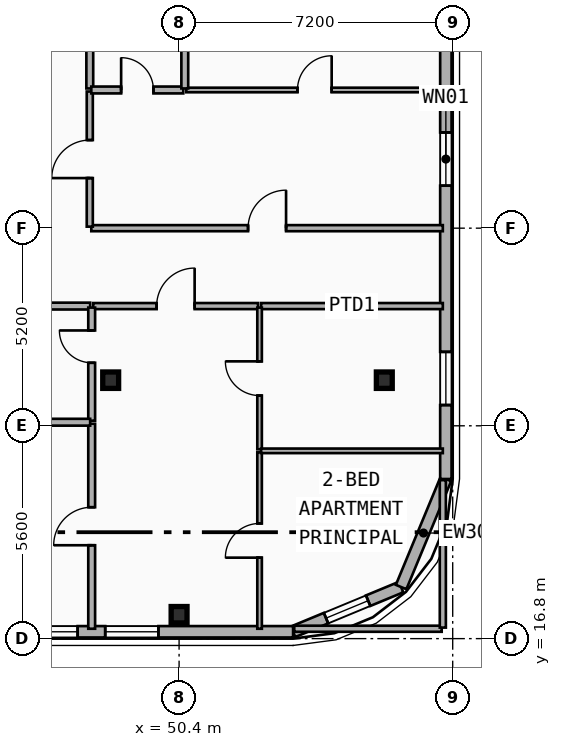
"""IFC4 building model, lengths in metres.
Left out: names, types, materials, properties, quantities, classifications, styles, units other than length and angle.
Written with IfcOpenShell. Run it as: python <this file> out.ifc"""

import sys

from ifc_helpers import new_model, si_unit, direction, frame, frame_2d, origin, origin_2d, place, context, subcontext, project, spatial, rectangle, i_section, extrude, element, fill, save


model = new_model("IFC4")
c1 = context("Model", 3, precision=1e-05, world=origin(), true_north=direction((0.0, 1.0)))
c2 = subcontext(c1, "Body", "Model", "MODEL_VIEW")
j1 = project(units=[si_unit("LENGTHUNIT", "METRE"), si_unit("PLANEANGLEUNIT", "RADIAN")], contexts=[c1])
p1 = place(None, origin())
s1 = spatial("IfcSite", under=j1, at=p1, CompositionType="ELEMENT")
p2 = place(p1, origin())
s2 = spatial("IfcBuilding", under=s1, at=p2, CompositionType="ELEMENT")
p3 = place(p2, frame((0.0, 0.0, 104.8)))
s3 = spatial("IfcBuildingStorey", under=s2, at=p3, CompositionType="ELEMENT", Elevation=104.8)
p4 = place(p3, frame((48.6, 23.6, 0.0), z_axis=(0.0, 0.0, 1.0), x_axis=(1.0, 0.0, 0.0)))
e1 = element("IfcColumn", 1, at=p4, inside=s3, PredefinedType="COLUMN", context=c2, shape_type="SweptSolid", body=[
    extrude(i_section(OverallWidth=0.418, OverallDepth=0.432, WebThickness=0.035, FlangeThickness=0.056, FilletRadius=0.015, at=origin_2d()), origin(), (0.0, 0.0, 1.0), 3.5),
])
p5 = place(p3, frame((50.4, 17.525, 0.0), z_axis=(0.0, -0.079891690793, 0.996803550226), x_axis=(1.0, 0.0, 0.0)))
e2 = element("IfcColumn", 2, at=p5, inside=s3, PredefinedType="COLUMN", context=c2, shape_type="SweptSolid", body=[
    extrude(i_section(OverallWidth=0.418, OverallDepth=0.432, WebThickness=0.035, FlangeThickness=0.056, FilletRadius=0.015, at=origin_2d()), origin(), (0.0, 0.0, 1.0), 3.511),
])
p6 = place(p3, frame((55.8, 23.6, 0.0), z_axis=(0.0, 0.0, 1.0), x_axis=(1.0, 0.0, 0.0)))
e3 = element("IfcColumn", 3, at=p6, inside=s3, PredefinedType="COLUMN", context=c2, shape_type="SweptSolid", body=[
    extrude(i_section(OverallWidth=0.418, OverallDepth=0.432, WebThickness=0.035, FlangeThickness=0.056, FilletRadius=0.015, at=origin_2d()), origin(), (0.0, 0.0, 1.0), 3.5),
])
p7 = place(p3, frame((56.243, 18.157, 0.0), z_axis=(0.0, 0.0, 1.0), x_axis=(-0.923882414032, -0.382676475685, 0.0)))
e4 = element("IfcWall", 4, at=p7, inside=s3, PredefinedType="SOLIDWALL", context=c2, shape_type="SweptSolid", body=[
    extrude(rectangle(XDim=3.077, YDim=0.3, at=frame_2d((1.539, 0.0))), origin(), (0.0, 0.0, 1.0), 3.24),
])
p8 = place(p7, frame((0.938, 0.0, 0.75)))
e5 = element("IfcOpeningElement", 5, at=p8, cuts=e4, PredefinedType="OPENING", context=c2, shape_type="SweptSolid", body=[
    extrude(rectangle(XDim=1.2, YDim=1.5, at=frame_2d((0.6, 0.75))), frame((0.0, 0.16, 0.0), z_axis=(0.0, -1.0, 0.0), x_axis=(1.0, 0.0, 0.0)), (0.0, 0.0, 1.0), 0.32),
])
p9 = place(p3, frame((57.42, 21.0, 0.0), z_axis=(0.0, 0.0, 1.0), x_axis=(-0.382636798336, -0.92389884758, 0.0)))
e6 = element("IfcWall", 6, at=p9, inside=s3, PredefinedType="SOLIDWALL", context=c2, shape_type="SweptSolid", body=[
    extrude(rectangle(XDim=3.077, YDim=0.3, at=frame_2d((1.538, 0.0))), origin(), (0.0, 0.0, 1.0), 3.24),
])
p10 = place(p3, frame((57.42, 39.0, 0.0), z_axis=(0.0, 0.0, 1.0), x_axis=(0.0, -1.0, 0.0)))
e7 = element("IfcWall", 7, at=p10, inside=s3, PredefinedType="SOLIDWALL", context=c2, shape_type="SweptSolid", body=[
    extrude(rectangle(XDim=18.0, YDim=0.3, at=frame_2d((9.0, 0.0))), origin(), (0.0, 0.0, 1.0), 3.24),
])
p11 = place(p10, frame((8.882, 0.0, 0.48)))
e8 = element("IfcOpeningElement", 8, at=p11, cuts=e7, PredefinedType="OPENING", context=c2, shape_type="SweptSolid", body=[
    extrude(rectangle(XDim=1.4, YDim=1.8, at=frame_2d((0.7, 0.9))), frame((0.0, 0.16, 0.0), z_axis=(0.0, -1.0, 0.0), x_axis=(1.0, 0.0, 0.0)), (0.0, 0.0, 1.0), 0.32),
])
p12 = place(p10, frame((3.621, 0.0, 0.48)))
e9 = element("IfcOpeningElement", 9, at=p12, cuts=e7, PredefinedType="OPENING", context=c2, shape_type="SweptSolid", body=[
    extrude(rectangle(XDim=1.4, YDim=1.8, at=frame_2d((0.7, 0.9))), frame((0.0, 0.16, 0.0), z_axis=(0.0, -1.0, 0.0), x_axis=(1.0, 0.0, 0.0)), (0.0, 0.0, 1.0), 0.32),
])
p13 = place(p10, frame((14.655, 0.0, 0.48)))
e10 = element("IfcOpeningElement", 10, at=p13, cuts=e7, PredefinedType="OPENING", context=c2, shape_type="SweptSolid", body=[
    extrude(rectangle(XDim=1.4, YDim=1.8, at=frame_2d((0.7, 0.9))), frame((0.0, 0.16, 0.0), z_axis=(0.0, -1.0, 0.0), x_axis=(1.0, 0.0, 0.0)), (0.0, 0.0, 1.0), 0.32),
])
p14 = place(p3, frame((53.4, 16.98, 0.0), z_axis=(0.0, 0.0, 1.0), x_axis=(-1.0, 0.0, 0.0)))
e11 = element("IfcWall", 11, at=p14, inside=s3, PredefinedType="SOLIDWALL", context=c2, shape_type="SweptSolid", body=[
    extrude(rectangle(XDim=49.2, YDim=0.3, at=frame_2d((24.6, 0.0))), origin(), (0.0, 0.0, 1.0), 3.24),
])
p15 = place(p14, frame((44.256, 0.0, 0.75)))
e12 = element("IfcOpeningElement", 12, at=p15, cuts=e11, PredefinedType="OPENING", context=c2, shape_type="SweptSolid", body=[
    extrude(rectangle(XDim=1.4, YDim=1.8, at=frame_2d((0.7, 0.9))), frame((0.0, 0.16, 0.0), z_axis=(0.0, -1.0, 0.0), x_axis=(1.0, 0.0, 0.0)), (0.0, 0.0, 1.0), 0.32),
])
p16 = place(p14, frame((42.33, 0.0, 0.68)))
e13 = element("IfcOpeningElement", 13, at=p16, cuts=e11, PredefinedType="OPENING", context=c2, shape_type="SweptSolid", body=[
    extrude(rectangle(XDim=1.2, YDim=1.5, at=frame_2d((0.6, 0.75))), frame((0.0, 0.16, 0.0), z_axis=(0.0, -1.0, 0.0), x_axis=(1.0, 0.0, 0.0)), (0.0, 0.0, 1.0), 0.32),
])
p17 = place(p14, frame((33.338, 0.0, 0.34)))
e14 = element("IfcOpeningElement", 14, at=p17, cuts=e11, PredefinedType="OPENING", context=c2, shape_type="SweptSolid", body=[
    extrude(rectangle(XDim=1.2, YDim=1.5, at=frame_2d((0.6, 0.75))), frame((0.0, 0.16, 0.0), z_axis=(0.0, -1.0, 0.0), x_axis=(1.0, 0.0, 0.0)), (0.0, 0.0, 1.0), 0.32),
])
p18 = place(p14, frame((39.04, 0.0, 1.22)))
e15 = element("IfcOpeningElement", 15, at=p18, cuts=e11, PredefinedType="OPENING", context=c2, shape_type="SweptSolid", body=[
    extrude(rectangle(XDim=1.1, YDim=1.05, at=frame_2d((0.55, 0.525))), frame((0.0, 0.16, 0.0), z_axis=(0.0, -1.0, 0.0), x_axis=(1.0, 0.0, 0.0)), (0.0, 0.0, 1.0), 0.32),
])
p19 = place(p14, frame((20.025, 0.0, 0.65)))
e16 = element("IfcOpeningElement", 16, at=p19, cuts=e11, PredefinedType="OPENING", context=c2, shape_type="SweptSolid", body=[
    extrude(rectangle(XDim=1.6, YDim=1.95, at=frame_2d((0.8, 0.975))), frame((0.0, 0.16, 0.0), z_axis=(0.0, -1.0, 0.0), x_axis=(1.0, 0.0, 0.0)), (0.0, 0.0, 1.0), 0.32),
])
p20 = place(p14, frame((9.06, 0.0, 0.48)))
e17 = element("IfcOpeningElement", 17, at=p20, cuts=e11, PredefinedType="OPENING", context=c2, shape_type="SweptSolid", body=[
    extrude(rectangle(XDim=1.2, YDim=1.5, at=frame_2d((0.6, 0.75))), frame((0.0, 0.16, 0.0), z_axis=(0.0, -1.0, 0.0), x_axis=(1.0, 0.0, 0.0)), (0.0, 0.0, 1.0), 0.32),
])
p21 = place(p14, frame((13.65, 0.0, 1.68)))
e18 = element("IfcOpeningElement", 18, at=p21, cuts=e11, PredefinedType="OPENING", context=c2, shape_type="SweptSolid", body=[
    extrude(rectangle(XDim=1.1, YDim=1.05, at=frame_2d((0.55, 0.525))), frame((0.0, 0.16, 0.0), z_axis=(0.0, -1.0, 0.0), x_axis=(1.0, 0.0, 0.0)), (0.0, 0.0, 1.0), 0.32),
])
p22 = place(p14, frame((3.544, 0.0, 0.75)))
e19 = element("IfcOpeningElement", 19, at=p22, cuts=e11, PredefinedType="OPENING", context=c2, shape_type="SweptSolid", body=[
    extrude(rectangle(XDim=1.4, YDim=1.8, at=frame_2d((0.7, 0.9))), frame((0.0, 0.16, 0.0), z_axis=(0.0, -1.0, 0.0), x_axis=(1.0, 0.0, 0.0)), (0.0, 0.0, 1.0), 0.32),
])
p23 = place(p14, frame((5.67, 0.0, 0.68)))
e20 = element("IfcOpeningElement", 20, at=p23, cuts=e11, PredefinedType="OPENING", context=c2, shape_type="SweptSolid", body=[
    extrude(rectangle(XDim=1.2, YDim=1.5, at=frame_2d((0.6, 0.75))), frame((0.0, 0.16, 0.0), z_axis=(0.0, -1.0, 0.0), x_axis=(1.0, 0.0, 0.0)), (0.0, 0.0, 1.0), 0.32),
])
p24 = place(p3, frame((48.09, 27.6, 0.0), z_axis=(0.0, 0.0, 1.0), x_axis=(1.0, 0.0, 0.0)))
e21 = element("IfcWall", 21, at=p24, inside=s3, PredefinedType="PARTITIONING", context=c2, shape_type="SweptSolid", body=[
    extrude(rectangle(XDim=9.25, YDim=0.16, at=frame_2d((4.625, 0.0))), origin(), (0.0, 0.0, 1.0), 2.57),
])
p25 = place(p24, frame((4.125, 0.0, 0.0)))
e22 = element("IfcOpeningElement", 22, at=p25, cuts=e21, PredefinedType="OPENING", context=c2, shape_type="SweptSolid", body=[
    extrude(rectangle(XDim=1.0, YDim=2.15, at=frame_2d((0.5, 1.075))), frame((0.0, 0.09, 0.0), z_axis=(0.0, -1.0, 0.0), x_axis=(1.0, 0.0, 0.0)), (0.0, 0.0, 1.0), 0.18),
])
p26 = place(p3, frame((48.14, 25.55, 0.0), z_axis=(0.0, 0.0, 1.0), x_axis=(1.0, 0.0, 0.0)))
e23 = element("IfcWall", 23, at=p26, inside=s3, PredefinedType="PARTITIONING", context=c2, shape_type="SweptSolid", body=[
    extrude(rectangle(XDim=4.338, YDim=0.16, at=frame_2d((2.169, 0.0))), origin(), (0.0, 0.0, 1.0), 2.57),
])
p27 = place(p26, frame((1.669, 0.0, 0.0)))
e24 = element("IfcOpeningElement", 24, at=p27, cuts=e23, PredefinedType="OPENING", context=c2, shape_type="SweptSolid", body=[
    extrude(rectangle(XDim=1.0, YDim=2.15, at=frame_2d((0.5, 1.075))), frame((0.0, 0.09, 0.0), z_axis=(0.0, -1.0, 0.0), x_axis=(1.0, 0.0, 0.0)), (0.0, 0.0, 1.0), 0.18),
])
p28 = place(p3, frame((45.44, 25.55, 0.0), z_axis=(0.0, 0.0, 1.0), x_axis=(1.0, 0.0, 0.0)))
e25 = element("IfcWall", 25, at=p28, inside=s3, PredefinedType="PLUMBINGWALL", context=c2, shape_type="SweptSolid", body=[
    extrude(rectangle(XDim=2.62, YDim=0.18, at=frame_2d((1.31, 0.0))), origin(), (0.0, 0.0, 1.0), 2.31),
])
p29 = place(p3, frame((52.558, 25.55, 0.0), z_axis=(0.0, 0.0, 1.0), x_axis=(1.0, 0.0, 0.0)))
e26 = element("IfcWall", 26, at=p29, inside=s3, PredefinedType="PARTITIONING", context=c2, shape_type="SweptSolid", body=[
    extrude(rectangle(XDim=4.782, YDim=0.16, at=frame_2d((2.391, 0.0))), origin(), (0.0, 0.0, 1.0), 2.57),
])
p30 = place(p3, frame((48.05, 27.64, 0.0), z_axis=(0.0, 0.0, 1.0), x_axis=(0.0, 1.0, 0.0)))
e27 = element("IfcWall", 27, at=p30, inside=s3, PredefinedType="PARTITIONING", context=c2, shape_type="SweptSolid", body=[
    extrude(rectangle(XDim=3.556, YDim=0.16, at=frame_2d((1.778, 0.0))), origin(), (0.0, 0.0, 1.0), 3.24),
])
p31 = place(p30, frame((1.278, 0.0, 0.0)))
e28 = element("IfcOpeningElement", 28, at=p31, cuts=e27, PredefinedType="OPENING", context=c2, shape_type="SweptSolid", body=[
    extrude(rectangle(XDim=1.0, YDim=2.15, at=frame_2d((0.5, 1.075))), frame((0.0, 0.09, 0.0), z_axis=(0.0, -1.0, 0.0), x_axis=(1.0, 0.0, 0.0)), (0.0, 0.0, 1.0), 0.18),
])
p32 = place(p3, frame((48.05, 31.276, 0.0), z_axis=(0.0, 0.0, 1.0), x_axis=(0.0, 1.0, 0.0)))
e29 = element("IfcWall", 29, at=p32, inside=s3, PredefinedType="PLUMBINGWALL", context=c2, shape_type="SweptSolid", body=[
    extrude(rectangle(XDim=1.793, YDim=0.18, at=frame_2d((0.896, 0.0))), origin(), (0.0, 0.0, 1.0), 3.24),
])
p33 = place(p3, frame((48.09, 31.236, 0.0), z_axis=(0.0, 0.0, 1.0), x_axis=(1.0, 0.0, 0.0)))
e30 = element("IfcWall", 30, at=p33, inside=s3, PredefinedType="PLUMBINGWALL", context=c2, shape_type="SweptSolid", body=[
    extrude(rectangle(XDim=2.42, YDim=0.18, at=frame_2d((1.21, 0.0))), origin(), (0.0, 0.0, 1.0), 2.57),
])
p34 = place(p33, frame((0.785, 0.0, 0.0)))
e31 = element("IfcOpeningElement", 31, at=p34, cuts=e30, PredefinedType="OPENING", context=c2, shape_type="SweptSolid", body=[
    extrude(rectangle(XDim=0.85, YDim=2.1, at=frame_2d((0.425, 1.05))), frame((0.0, 0.1, 0.0), z_axis=(0.0, -1.0, 0.0), x_axis=(1.0, 0.0, 0.0)), (0.0, 0.0, 1.0), 0.2),
])
p35 = place(p3, frame((50.59, 31.236, 0.0), z_axis=(0.0, 0.0, 1.0), x_axis=(1.0, 0.0, 0.0)))
e32 = element("IfcWall", 32, at=p35, inside=s3, PredefinedType="PARTITIONING", context=c2, shape_type="SweptSolid", body=[
    extrude(rectangle(XDim=6.75, YDim=0.12, at=frame_2d((3.375, 0.0))), origin(), (0.0, 0.0, 1.0), 2.57),
])
p36 = place(p35, frame((2.925, 0.0, 0.0)))
e33 = element("IfcOpeningElement", 33, at=p36, cuts=e32, PredefinedType="OPENING", context=c2, shape_type="SweptSolid", body=[
    extrude(rectangle(XDim=0.9, YDim=2.1, at=frame_2d((0.45, 1.05))), frame((0.0, 0.07, 0.0), z_axis=(0.0, -1.0, 0.0), x_axis=(1.0, 0.0, 0.0)), (0.0, 0.0, 1.0), 0.14),
])
p37 = place(p3, frame((50.55, 31.276, 0.0), z_axis=(0.0, 0.0, 1.0), x_axis=(0.0, 1.0, 0.0)))
e34 = element("IfcWall", 34, at=p37, inside=s3, PredefinedType="PLUMBINGWALL", context=c2, shape_type="SweptSolid", body=[
    extrude(rectangle(XDim=1.793, YDim=0.18, at=frame_2d((0.896, 0.0))), origin(), (0.0, 0.0, 1.0), 2.57),
])
p38 = place(p3, frame((48.1, 17.06, 0.0), z_axis=(0.0, 0.0, 1.0), x_axis=(0.0, 1.0, 0.0)))
e35 = element("IfcWall", 35, at=p38, inside=s3, PredefinedType="PLUMBINGWALL", context=c2, shape_type="SweptSolid", body=[
    extrude(rectangle(XDim=5.394, YDim=0.18, at=frame_2d((2.697, 0.0))), origin(), (0.0, 0.0, 1.0), 2.72),
])
p39 = place(p38, frame((2.197, 0.0, 0.0)))
e36 = element("IfcOpeningElement", 36, at=p39, cuts=e35, PredefinedType="OPENING", context=c2, shape_type="SweptSolid", body=[
    extrude(rectangle(XDim=1.0, YDim=2.15, at=frame_2d((0.5, 1.075))), frame((0.0, 0.1, 0.0), z_axis=(0.0, -1.0, 0.0), x_axis=(1.0, 0.0, 0.0)), (0.0, 0.0, 1.0), 0.2),
])
p40 = place(p3, frame((48.1, 22.534, 0.0), z_axis=(0.0, 0.0, 1.0), x_axis=(0.0, 1.0, 0.0)))
e37 = element("IfcWall", 37, at=p40, inside=s3, PredefinedType="PLUMBINGWALL", context=c2, shape_type="SweptSolid", body=[
    extrude(rectangle(XDim=2.976, YDim=0.18, at=frame_2d((1.488, 0.0))), origin(), (0.0, 0.0, 1.0), 2.72),
])
p41 = place(p40, frame((1.524, 0.0, 0.0)))
e38 = element("IfcOpeningElement", 38, at=p41, cuts=e37, PredefinedType="OPENING", context=c2, shape_type="SweptSolid", body=[
    extrude(rectangle(XDim=0.85, YDim=2.1, at=frame_2d((0.425, 1.05))), frame((0.0, 0.1, 0.0), z_axis=(0.0, -1.0, 0.0), x_axis=(1.0, 0.0, 0.0)), (0.0, 0.0, 1.0), 0.2),
])
p42 = place(p3, frame((52.518, 17.06, 0.0), z_axis=(0.0, 0.0, 1.0), x_axis=(0.0, 1.0, 0.0)))
e39 = element("IfcWall", 39, at=p42, inside=s3, PredefinedType="PARTITIONING", context=c2, shape_type="SweptSolid", body=[
    extrude(rectangle(XDim=4.641, YDim=0.12, at=frame_2d((2.32, 0.0))), origin(), (0.0, 0.0, 1.0), 2.72),
])
p43 = place(p42, frame((1.871, 0.0, 0.0)))
e40 = element("IfcOpeningElement", 40, at=p43, cuts=e39, PredefinedType="OPENING", context=c2, shape_type="SweptSolid", body=[
    extrude(rectangle(XDim=0.9, YDim=2.1, at=frame_2d((0.45, 1.05))), frame((0.0, 0.07, 0.0), z_axis=(0.0, -1.0, 0.0), x_axis=(1.0, 0.0, 0.0)), (0.0, 0.0, 1.0), 0.14),
])
p44 = place(p3, frame((52.518, 21.781, 0.0), z_axis=(0.0, 0.0, 1.0), x_axis=(0.0, 1.0, 0.0)))
e41 = element("IfcWall", 41, at=p44, inside=s3, PredefinedType="PARTITIONING", context=c2, shape_type="SweptSolid", body=[
    extrude(rectangle(XDim=3.729, YDim=0.12, at=frame_2d((1.865, 0.0))), origin(), (0.0, 0.0, 1.0), 2.72),
])
p45 = place(p44, frame((1.415, 0.0, 0.0)))
e42 = element("IfcOpeningElement", 42, at=p45, cuts=e41, PredefinedType="OPENING", context=c2, shape_type="SweptSolid", body=[
    extrude(rectangle(XDim=0.9, YDim=2.1, at=frame_2d((0.45, 1.05))), frame((0.0, 0.07, 0.0), z_axis=(0.0, -1.0, 0.0), x_axis=(1.0, 0.0, 0.0)), (0.0, 0.0, 1.0), 0.14),
])
p46 = place(p3, frame((45.44, 22.494, 0.0), z_axis=(0.0, 0.0, 1.0), x_axis=(1.0, 0.0, 0.0)))
e43 = element("IfcWall", 43, at=p46, inside=s3, PredefinedType="PLUMBINGWALL", context=c2, shape_type="SweptSolid", body=[
    extrude(rectangle(XDim=2.62, YDim=0.18, at=frame_2d((1.31, 0.0))), origin(), (0.0, 0.0, 1.0), 2.31),
])
p47 = place(p3, frame((52.558, 21.741, 0.0), z_axis=(0.0, 0.0, 1.0), x_axis=(1.0, 0.0, 0.0)))
e44 = element("IfcWall", 44, at=p47, inside=s3, PredefinedType="PARTITIONING", context=c2, shape_type="SweptSolid", body=[
    extrude(rectangle(XDim=4.782, YDim=0.12, at=frame_2d((2.391, 0.0))), origin(), (0.0, 0.0, 1.0), 2.72),
])
p48 = place(p3, frame((53.43, 17.06, 0.0), z_axis=(0.0, 0.0, 1.0), x_axis=(1.0, 0.0, 0.0)))
e45 = element("IfcWall", 45, at=p48, inside=s3, PredefinedType="PARTITIONING", context=c2, shape_type="SweptSolid", body=[
    extrude(rectangle(XDim=3.88, YDim=0.16, at=frame_2d((1.94, 0.0))), origin(), (0.0, 0.0, 1.0), 2.72),
])
p49 = place(p3, frame((57.34, 17.09, 0.0), z_axis=(0.0, 0.0, 1.0), x_axis=(0.0, 1.0, 0.0)))
e46 = element("IfcWall", 46, at=p49, inside=s3, PredefinedType="PARTITIONING", context=c2, shape_type="SweptSolid", body=[
    extrude(rectangle(XDim=3.88, YDim=0.16, at=frame_2d((1.94, 0.0))), origin(), (0.0, 0.0, 1.0), 3.24),
])
p50 = place(p11, origin())
e47 = element("IfcWindow", 47, at=p50, inside=s3, PartitioningType="SINGLE_PANEL", PredefinedType="WINDOW", context=c2, shape_type="SweptSolid", body=[
    extrude(rectangle(XDim=1.4, YDim=1.8, at=frame_2d((0.7, 0.9))), frame((0.0, 0.03, 0.0), z_axis=(0.0, -1.0, 0.0), x_axis=(1.0, 0.0, 0.0)), (0.0, 0.0, 1.0), 0.06),
])
fill(e8, e47)
p51 = place(p13, origin())
e48 = element("IfcWindow", 48, at=p51, inside=s3, PartitioningType="SINGLE_PANEL", PredefinedType="WINDOW", context=c2, shape_type="SweptSolid", body=[
    extrude(rectangle(XDim=1.4, YDim=1.8, at=frame_2d((0.7, 0.9))), frame((0.0, 0.03, 0.0), z_axis=(0.0, -1.0, 0.0), x_axis=(1.0, 0.0, 0.0)), (0.0, 0.0, 1.0), 0.06),
])
fill(e10, e48)
p52 = place(p22, origin())
e49 = element("IfcWindow", 49, at=p52, inside=s3, PartitioningType="SINGLE_PANEL", PredefinedType="WINDOW", context=c2, shape_type="SweptSolid", body=[
    extrude(rectangle(XDim=1.4, YDim=1.8, at=frame_2d((0.7, 0.9))), frame((0.0, 0.03, 0.0), z_axis=(0.0, -1.0, 0.0), x_axis=(1.0, 0.0, 0.0)), (0.0, 0.0, 1.0), 0.06),
])
fill(e19, e49)
p53 = place(p23, origin())
e50 = element("IfcWindow", 50, at=p53, inside=s3, PartitioningType="SINGLE_PANEL", PredefinedType="WINDOW", context=c2, shape_type="SweptSolid", body=[
    extrude(rectangle(XDim=1.2, YDim=1.5, at=frame_2d((0.6, 0.75))), frame((0.0, 0.03, 0.0), z_axis=(0.0, -1.0, 0.0), x_axis=(1.0, 0.0, 0.0)), (0.0, 0.0, 1.0), 0.06),
])
fill(e20, e50)
p54 = place(p8, origin())
e51 = element("IfcWindow", 51, at=p54, inside=s3, PartitioningType="SINGLE_PANEL", PredefinedType="WINDOW", context=c2, shape_type="SweptSolid", body=[
    extrude(rectangle(XDim=1.2, YDim=1.5, at=frame_2d((0.6, 0.75))), frame((0.0, 0.03, 0.0), z_axis=(0.0, -1.0, 0.0), x_axis=(1.0, 0.0, 0.0)), (0.0, 0.0, 1.0), 0.06),
])
fill(e5, e51)
p55 = place(p25, origin())
e52 = element("IfcDoor", 52, at=p55, inside=s3, OperationType="SINGLE_SWING_RIGHT", PredefinedType="DOOR", context=c2, shape_type="SweptSolid", body=[
    extrude(rectangle(XDim=1.0, YDim=2.15, at=frame_2d((0.5, 1.075))), frame((0.0, 0.025, 0.0), z_axis=(0.0, -1.0, 0.0), x_axis=(1.0, 0.0, 0.0)), (0.0, 0.0, 1.0), 0.05),
])
fill(e22, e52)
p56 = place(p27, origin())
e53 = element("IfcDoor", 53, at=p56, inside=s3, OperationType="SINGLE_SWING_RIGHT", PredefinedType="DOOR", context=c2, shape_type="SweptSolid", body=[
    extrude(rectangle(XDim=1.0, YDim=2.15, at=frame_2d((0.5, 1.075))), frame((0.0, 0.025, 0.0), z_axis=(0.0, -1.0, 0.0), x_axis=(1.0, 0.0, 0.0)), (0.0, 0.0, 1.0), 0.05),
])
fill(e24, e53)
p57 = place(p31, origin())
e54 = element("IfcDoor", 54, at=p57, inside=s3, OperationType="SINGLE_SWING_LEFT", PredefinedType="DOOR", context=c2, shape_type="SweptSolid", body=[
    extrude(rectangle(XDim=1.0, YDim=2.15, at=frame_2d((0.5, 1.075))), frame((0.0, 0.025, 0.0), z_axis=(0.0, -1.0, 0.0), x_axis=(1.0, 0.0, 0.0)), (0.0, 0.0, 1.0), 0.05),
])
fill(e28, e54)
p58 = place(p34, origin())
e55 = element("IfcDoor", 55, at=p58, inside=s3, OperationType="SINGLE_SWING_LEFT", PredefinedType="DOOR", context=c2, shape_type="SweptSolid", body=[
    extrude(rectangle(XDim=0.85, YDim=2.1, at=frame_2d((0.425, 1.05))), frame((0.0, 0.025, 0.0), z_axis=(0.0, -1.0, 0.0), x_axis=(1.0, 0.0, 0.0)), (0.0, 0.0, 1.0), 0.05),
])
fill(e31, e55)
p59 = place(p36, origin())
e56 = element("IfcDoor", 56, at=p59, inside=s3, OperationType="SINGLE_SWING_RIGHT", PredefinedType="DOOR", context=c2, shape_type="SweptSolid", body=[
    extrude(rectangle(XDim=0.9, YDim=2.1, at=frame_2d((0.45, 1.05))), frame((0.0, 0.025, 0.0), z_axis=(0.0, -1.0, 0.0), x_axis=(1.0, 0.0, 0.0)), (0.0, 0.0, 1.0), 0.05),
])
fill(e33, e56)
p60 = place(p39, origin())
e57 = element("IfcDoor", 57, at=p60, inside=s3, OperationType="SINGLE_SWING_LEFT", PredefinedType="DOOR", context=c2, shape_type="SweptSolid", body=[
    extrude(rectangle(XDim=1.0, YDim=2.15, at=frame_2d((0.5, 1.075))), frame((0.0, 0.025, 0.0), z_axis=(0.0, -1.0, 0.0), x_axis=(1.0, 0.0, 0.0)), (0.0, 0.0, 1.0), 0.05),
])
fill(e36, e57)
p61 = place(p41, origin())
e58 = element("IfcDoor", 58, at=p61, inside=s3, OperationType="SINGLE_SWING_RIGHT", PredefinedType="DOOR", context=c2, shape_type="SweptSolid", body=[
    extrude(rectangle(XDim=0.85, YDim=2.1, at=frame_2d((0.425, 1.05))), frame((0.0, 0.025, 0.0), z_axis=(0.0, -1.0, 0.0), x_axis=(1.0, 0.0, 0.0)), (0.0, 0.0, 1.0), 0.05),
])
fill(e38, e58)
p62 = place(p43, origin())
e59 = element("IfcDoor", 59, at=p62, inside=s3, OperationType="SINGLE_SWING_LEFT", PredefinedType="DOOR", context=c2, shape_type="SweptSolid", body=[
    extrude(rectangle(XDim=0.9, YDim=2.1, at=frame_2d((0.45, 1.05))), frame((0.0, 0.025, 0.0), z_axis=(0.0, -1.0, 0.0), x_axis=(1.0, 0.0, 0.0)), (0.0, 0.0, 1.0), 0.05),
])
fill(e40, e59)
p63 = place(p45, origin())
e60 = element("IfcDoor", 60, at=p63, inside=s3, OperationType="SINGLE_SWING_RIGHT", PredefinedType="DOOR", context=c2, shape_type="SweptSolid", body=[
    extrude(rectangle(XDim=0.9, YDim=2.1, at=frame_2d((0.45, 1.05))), frame((0.0, 0.025, 0.0), z_axis=(0.0, -1.0, 0.0), x_axis=(1.0, 0.0, 0.0)), (0.0, 0.0, 1.0), 0.05),
])
fill(e42, e60)
save(model, sys.argv[1])
